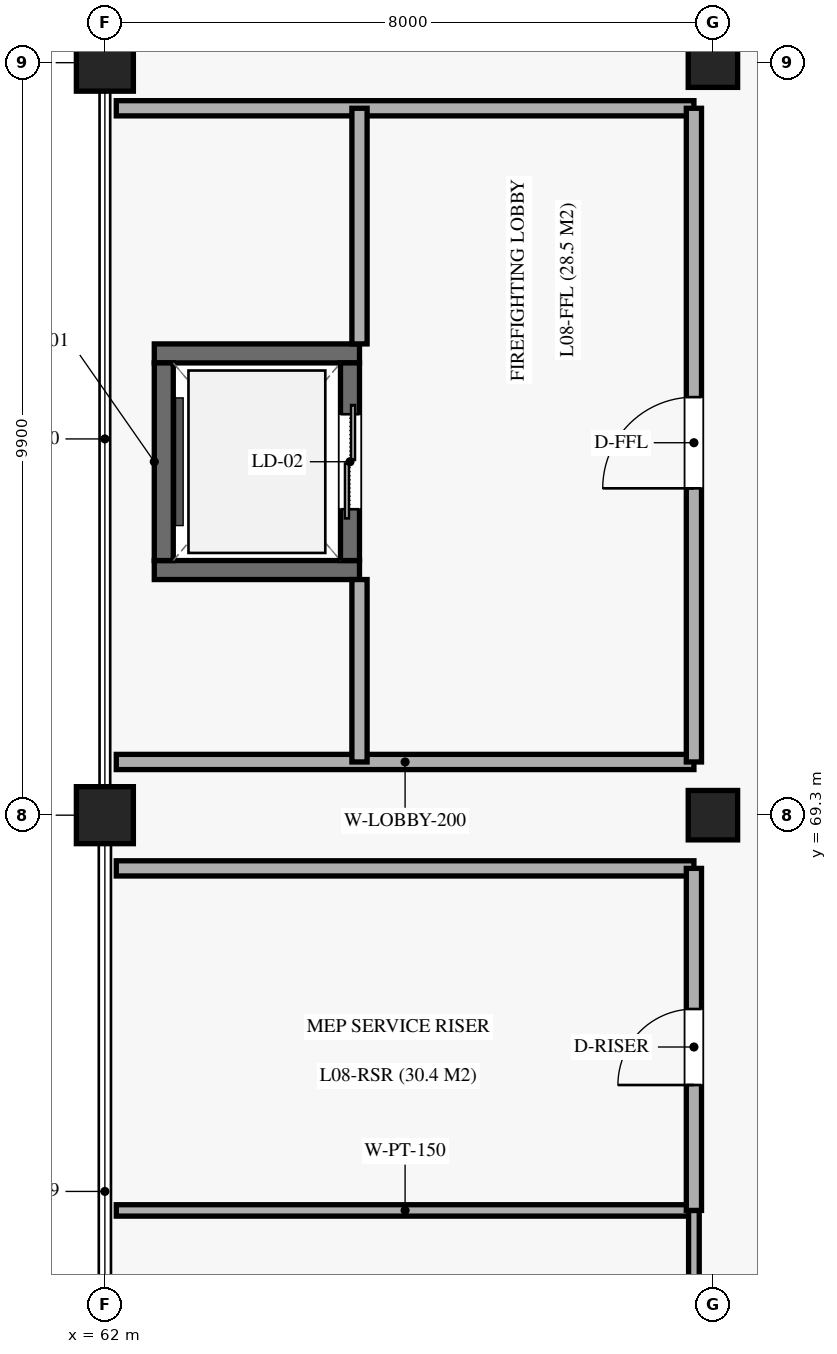
"""IFC4 building model, lengths in metres.
Left out: names, types, materials, properties, quantities, classifications, styles, units other than length and angle.
Written with IfcOpenShell. Run it as: python <this file> out.ifc"""

import sys

from ifc_helpers import new_model, si_unit, direction, frame, frame_2d, origin, origin_2d, place, context, subcontext, project, spatial, rectangle, extrude, element, fill, save


model = new_model("IFC4")
c1 = context("Model", 3, precision=1e-05, world=origin(), true_north=direction((0.0, 1.0)))
c2 = subcontext(c1, "Body", "Model", "MODEL_VIEW")
j1 = project(units=[si_unit("LENGTHUNIT", "METRE"), si_unit("PLANEANGLEUNIT", "RADIAN")], contexts=[c1])
p1 = place(None, origin())
s1 = spatial("IfcSite", under=j1, at=p1, CompositionType="ELEMENT")
p2 = place(p1, origin())
s2 = spatial("IfcBuilding", under=s1, at=p2, CompositionType="ELEMENT")
p3 = place(p2, frame((0.0, 0.0, 42.33)))
s3 = spatial("IfcBuildingStorey", under=s2, at=p3, CompositionType="ELEMENT", Elevation=42.33)
for number, where, z_axis, x_axis in (
    (1, (62.0, 69.3, 0.0), (0.0, 0.0, 1.0), (1.0, 0.0, 0.0)),
    (2, (62.0, 79.2, 0.0), (0.0, 0.0, 1.0), (1.0, 0.0, 0.0)),
):
    element("IfcColumn", number, at=place(p3, frame(where, z_axis=z_axis, x_axis=x_axis)), inside=s3, PredefinedType="COLUMN", context=c2, shape_type="SweptSolid", body=[
        extrude(rectangle(XDim=0.75, YDim=0.75, at=origin_2d()), origin(), (0.0, 0.0, 1.0), 4.59),
    ])
for number, where, z_axis, x_axis in (
    (3, (70.0, 69.3, 0.0), (0.0, 0.0, 1.0), (1.0, 0.0, 0.0)),
    (4, (70.0, 79.2, 0.0), (0.0, 0.0, 1.0), (1.0, 0.0, 0.0)),
):
    element("IfcColumn", number, at=place(p3, frame(where, z_axis=z_axis, x_axis=x_axis)), inside=s3, PredefinedType="COLUMN", context=c2, shape_type="SweptSolid", body=[
        extrude(rectangle(XDim=0.65, YDim=0.65, at=origin_2d()), origin(), (0.0, 0.0, 1.0), 4.59),
    ])
for number, where, z_axis, x_axis in (
    (5, (62.65, 72.525, 0.0), (0.0, 0.0, 1.0), (1.0, 0.0, 0.0)),
    (6, (62.65, 75.375, 0.0), (0.0, 0.0, 1.0), (1.0, 0.0, 0.0)),
):
    element("IfcWall", number, at=place(p3, frame(where, z_axis=z_axis, x_axis=x_axis)), inside=s3, PredefinedType="SOLIDWALL", context=c2, shape_type="SweptSolid", body=[
        extrude(rectangle(XDim=2.7, YDim=0.25, at=frame_2d((1.35, 0.0))), origin(), (0.0, 0.0, 1.0), 4.32),
    ])
p4 = place(p3, frame((62.775, 72.65, 0.0), z_axis=(0.0, 0.0, 1.0), x_axis=(0.0, 1.0, 0.0)))
e7 = element("IfcWall", 7, at=p4, inside=s3, PredefinedType="SOLIDWALL", context=c2, shape_type="SweptSolid", body=[
    extrude(rectangle(XDim=2.6, YDim=0.25, at=frame_2d((1.3, 0.0))), origin(), (0.0, 0.0, 1.0), 4.32),
])
p5 = place(p3, frame((65.225, 72.65, 0.0), z_axis=(0.0, 0.0, 1.0), x_axis=(0.0, 1.0, 0.0)))
e8 = element("IfcWall", 8, at=p5, inside=s3, PredefinedType="SOLIDWALL", context=c2, shape_type="SweptSolid", body=[
    extrude(rectangle(XDim=2.6, YDim=0.25, at=frame_2d((1.3, 0.0))), origin(), (0.0, 0.0, 1.0), 4.32),
])
p6 = place(p5, frame((0.675, 0.0, 0.0)))
e9 = element("IfcOpeningElement", 9, at=p6, cuts=e8, PredefinedType="OPENING", context=c2, shape_type="SweptSolid", body=[
    extrude(rectangle(XDim=1.25, YDim=2.2, at=frame_2d((0.625, 1.1))), frame((0.0, 0.135, 0.0), z_axis=(0.0, -1.0, 0.0), x_axis=(1.0, 0.0, 0.0)), (0.0, 0.0, 1.0), 0.27),
])
for number, where, z_axis, x_axis in (
    (10, (62.15, 70.0, 0.0), (0.0, 0.0, 1.0), (1.0, 0.0, 0.0)),
    (11, (62.15, 78.6, 0.0), (0.0, 0.0, 1.0), (1.0, 0.0, 0.0)),
):
    element("IfcWall", number, at=place(p3, frame(where, z_axis=z_axis, x_axis=x_axis)), inside=s3, PredefinedType="SOLIDWALL", context=c2, shape_type="SweptSolid", body=[
        extrude(rectangle(XDim=7.6, YDim=0.2, at=frame_2d((3.8, 0.0))), origin(), (0.0, 0.0, 1.0), 3.46),
    ])
p7 = place(p3, frame((65.35, 70.0, 0.0), z_axis=(0.0, 0.0, 1.0), x_axis=(0.0, 1.0, 0.0)))
e12 = element("IfcWall", 12, at=p7, inside=s3, PredefinedType="SOLIDWALL", context=c2, shape_type="SweptSolid", body=[
    extrude(rectangle(XDim=2.4, YDim=0.2, at=frame_2d((1.2, 0.0))), origin(), (0.0, 0.0, 1.0), 3.46),
])
p8 = place(p3, frame((65.35, 75.5, 0.0), z_axis=(0.0, 0.0, 1.0), x_axis=(0.0, 1.0, 0.0)))
e13 = element("IfcWall", 13, at=p8, inside=s3, PredefinedType="SOLIDWALL", context=c2, shape_type="SweptSolid", body=[
    extrude(rectangle(XDim=3.1, YDim=0.2, at=frame_2d((1.55, 0.0))), origin(), (0.0, 0.0, 1.0), 3.46),
])
p9 = place(p3, frame((69.75, 70.0, 0.0), z_axis=(0.0, 0.0, 1.0), x_axis=(0.0, 1.0, 0.0)))
e14 = element("IfcWall", 14, at=p9, inside=s3, PredefinedType="SOLIDWALL", context=c2, shape_type="SweptSolid", body=[
    extrude(rectangle(XDim=8.6, YDim=0.2, at=frame_2d((4.3, 0.0))), origin(), (0.0, 0.0, 1.0), 3.46),
])
p10 = place(p9, frame((3.6, 0.0, 0.0)))
e15 = element("IfcOpeningElement", 15, at=p10, cuts=e14, PredefinedType="OPENING", context=c2, shape_type="SweptSolid", body=[
    extrude(rectangle(XDim=1.2, YDim=2.25, at=frame_2d((0.6, 1.125))), frame((0.0, 0.11, 0.0), z_axis=(0.0, -1.0, 0.0), x_axis=(1.0, 0.0, 0.0)), (0.0, 0.0, 1.0), 0.22),
])
p11 = place(p3, frame((62.15, 64.1, 0.0), z_axis=(0.0, 0.0, 1.0), x_axis=(1.0, 0.0, 0.0)))
e16 = element("IfcWall", 16, at=p11, inside=s3, PredefinedType="PARTITIONING", context=c2, shape_type="SweptSolid", body=[
    extrude(rectangle(XDim=7.6, YDim=0.15, at=frame_2d((3.8, 0.0))), origin(), (0.0, 0.0, 1.0), 3.46),
])
p12 = place(p3, frame((69.75, 59.9, 0.0), z_axis=(0.0, 0.0, 1.0), x_axis=(0.0, 1.0, 0.0)))
e17 = element("IfcWall", 17, at=p12, inside=s3, PredefinedType="PARTITIONING", context=c2, shape_type="SweptSolid", body=[
    extrude(rectangle(XDim=4.2, YDim=0.14, at=frame_2d((2.1, 0.0))), origin(), (0.0, 0.0, 1.0), 3.46),
])
p13 = place(p12, frame((1.5, 0.0, 0.0)))
e18 = element("IfcOpeningElement", 18, at=p13, cuts=e17, PredefinedType="OPENING", context=c2, shape_type="SweptSolid", body=[
    extrude(rectangle(XDim=0.95, YDim=2.1, at=frame_2d((0.475, 1.05))), frame((0.0, 0.08, 0.0), z_axis=(0.0, -1.0, 0.0), x_axis=(1.0, 0.0, 0.0)), (0.0, 0.0, 1.0), 0.16),
])
p14 = place(p3, frame((62.15, 68.6, 0.0), z_axis=(0.0, 0.0, 1.0), x_axis=(1.0, 0.0, 0.0)))
e19 = element("IfcWall", 19, at=p14, inside=s3, PredefinedType="SOLIDWALL", context=c2, shape_type="SweptSolid", body=[
    extrude(rectangle(XDim=7.6, YDim=0.2, at=frame_2d((3.8, 0.0))), origin(), (0.0, 0.0, 1.0), 3.46),
])
p15 = place(p3, frame((69.75, 64.1, 0.0), z_axis=(0.0, 0.0, 1.0), x_axis=(0.0, 1.0, 0.0)))
e20 = element("IfcWall", 20, at=p15, inside=s3, PredefinedType="SOLIDWALL", context=c2, shape_type="SweptSolid", body=[
    extrude(rectangle(XDim=4.5, YDim=0.2, at=frame_2d((2.25, 0.0))), origin(), (0.0, 0.0, 1.0), 3.46),
])
p16 = place(p15, frame((1.65, 0.0, 0.0)))
e21 = element("IfcOpeningElement", 21, at=p16, cuts=e20, PredefinedType="OPENING", context=c2, shape_type="SweptSolid", body=[
    extrude(rectangle(XDim=1.0, YDim=2.15, at=frame_2d((0.5, 1.075))), frame((0.0, 0.11, 0.0), z_axis=(0.0, -1.0, 0.0), x_axis=(1.0, 0.0, 0.0)), (0.0, 0.0, 1.0), 0.22),
])
p17 = place(p6, origin())
e22 = element("IfcDoor", 22, at=p17, inside=s3, OperationType="DOUBLE_DOOR_SLIDING", PredefinedType="DOOR", context=c2, shape_type="SweptSolid", body=[
    extrude(rectangle(XDim=1.25, YDim=2.2, at=frame_2d((0.625, 1.1))), frame((0.0, 0.025, 0.0), z_axis=(0.0, -1.0, 0.0), x_axis=(1.0, 0.0, 0.0)), (0.0, 0.0, 1.0), 0.05),
])
fill(e9, e22)
p18 = place(p10, origin())
e23 = element("IfcDoor", 23, at=p18, inside=s3, OperationType="SINGLE_SWING_LEFT", PredefinedType="DOOR", context=c2, shape_type="SweptSolid", body=[
    extrude(rectangle(XDim=1.2, YDim=2.25, at=frame_2d((0.6, 1.125))), frame((0.0, 0.025, 0.0), z_axis=(0.0, -1.0, 0.0), x_axis=(1.0, 0.0, 0.0)), (0.0, 0.0, 1.0), 0.05),
])
fill(e15, e23)
p19 = place(p16, origin())
e24 = element("IfcDoor", 24, at=p19, inside=s3, OperationType="SINGLE_SWING_LEFT", PredefinedType="DOOR", context=c2, shape_type="SweptSolid", body=[
    extrude(rectangle(XDim=1.0, YDim=2.15, at=frame_2d((0.5, 1.075))), frame((0.0, 0.025, 0.0), z_axis=(0.0, -1.0, 0.0), x_axis=(1.0, 0.0, 0.0)), (0.0, 0.0, 1.0), 0.05),
])
fill(e21, e24)
save(model, sys.argv[1])
